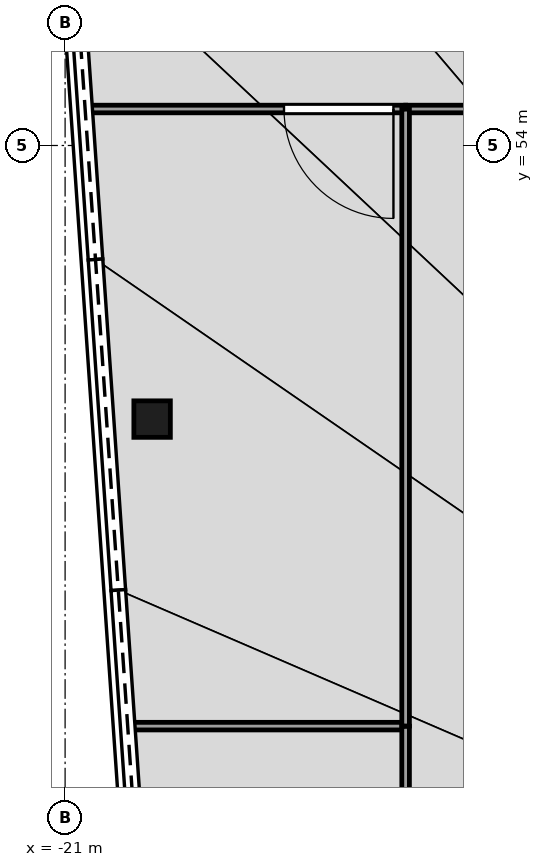
"""IFC4 building model, lengths in metres.
Left out: names, types, materials, properties, quantities, classifications, styles, units other than length and angle.
Written with IfcOpenShell. Run it as: python <this file> out.ifc"""

import sys

from ifc_helpers import new_model, si_unit, direction, frame, frame_2d, origin, origin_2d, place, context, subcontext, project, spatial, rectangle, hollow_rectangle, extrude, element, fill, save


model = new_model("IFC4")
c1 = context("Model", 3, precision=1e-05, world=origin(), true_north=direction((0.0, 1.0)))
c2 = subcontext(c1, "Body", "Model", "MODEL_VIEW")
j1 = project(units=[si_unit("LENGTHUNIT", "METRE"), si_unit("PLANEANGLEUNIT", "RADIAN")], contexts=[c1])
p1 = place(None, origin())
s1 = spatial("IfcSite", under=j1, at=p1, CompositionType="ELEMENT")
p2 = place(p1, origin())
s2 = spatial("IfcBuilding", under=s1, at=p2, CompositionType="ELEMENT")
p3 = place(p2, frame((0.0, 0.0, 368.0)))
s3 = spatial("IfcBuildingStorey", under=s2, at=p3, CompositionType="ELEMENT", Elevation=368.0)
p4 = place(p3, frame((-19.569, 49.5, 0.0), z_axis=(0.0, 0.0, 1.0), x_axis=(1.0, 0.0, 0.0)))
e1 = element("IfcColumn", 1, at=p4, inside=s3, PredefinedType="COLUMN", context=c2, shape_type="SweptSolid", body=[
    extrude(hollow_rectangle(XDim=0.6, YDim=0.6, WallThickness=0.025, at=origin_2d()), origin(), (0.0, 0.0, 1.0), 3.3),
])
p5 = place(p3, frame((-15.4, 54.6, 0.0), z_axis=(0.0, 0.0, 1.0), x_axis=(-1.0, 0.0, 0.0)))
e2 = element("IfcWall", 2, at=p5, inside=s3, PredefinedType="PARTITIONING", context=c2, shape_type="SweptSolid", body=[
    extrude(rectangle(XDim=5.351, YDim=0.125, at=frame_2d((2.675, 0.0))), origin(), (0.0, 0.0, 1.0), 2.47),
])
p6 = place(p5, frame((0.2, 0.0, 0.0)))
e3 = element("IfcOpeningElement", 3, at=p6, cuts=e2, PredefinedType="OPENING", context=c2, shape_type="SweptSolid", body=[
    extrude(rectangle(XDim=1.8, YDim=2.4, at=frame_2d((0.9, 1.2))), frame((0.0, 0.073, 0.0), z_axis=(0.0, -1.0, 0.0), x_axis=(1.0, 0.0, 0.0)), (0.0, 0.0, 1.0), 0.145),
])
p7 = place(p3, frame((-20.051, 44.45, 0.0), z_axis=(0.0, 0.0, 1.0), x_axis=(1.0, 0.0, 0.0)))
e4 = element("IfcWall", 4, at=p7, inside=s3, PredefinedType="PARTITIONING", context=c2, shape_type="SweptSolid", body=[
    extrude(rectangle(XDim=4.651, YDim=0.125, at=frame_2d((2.325, 0.0))), origin(), (0.0, 0.0, 1.0), 2.47),
])
p8 = place(p3, frame((-13.062, 54.6, 0.0), z_axis=(0.0, 0.0, 1.0), x_axis=(-1.0, 0.0, 0.0)))
e5 = element("IfcWall", 5, at=p8, inside=s3, PredefinedType="PARTITIONING", context=c2, shape_type="SweptSolid", body=[
    extrude(rectangle(XDim=2.335, YDim=0.125, at=frame_2d((1.168, 0.0))), origin(), (0.0, 0.0, 1.0), 3.3),
])
p9 = place(p3, frame((-15.4, 44.448, 0.0), z_axis=(0.0, 0.0, 1.0), x_axis=(0.0, -1.0, 0.0)))
e6 = element("IfcWall", 6, at=p9, inside=s3, PredefinedType="PARTITIONING", context=c2, shape_type="SweptSolid", body=[
    extrude(rectangle(XDim=2.446, YDim=0.125, at=frame_2d((1.223, 0.0))), origin(), (0.0, 0.0, 1.0), 3.3),
])
p10 = place(p3, frame((-15.4, 54.598, 0.0), z_axis=(0.0, 0.0, 1.0), x_axis=(0.0, -1.0, 0.0)))
e7 = element("IfcWall", 7, at=p10, inside=s3, PredefinedType="PARTITIONING", context=c2, shape_type="SweptSolid", body=[
    extrude(rectangle(XDim=10.146, YDim=0.125, at=frame_2d((5.073, 0.0))), origin(), (0.0, 0.0, 1.0), 2.78),
])
p11 = place(p6, origin())
e8 = element("IfcDoor", 8, at=p11, inside=s3, OperationType="DOUBLE_DOOR_SINGLE_SWING", PredefinedType="DOOR", context=c2, shape_type="SweptSolid", body=[
    extrude(rectangle(XDim=1.8, YDim=2.4, at=frame_2d((0.9, 1.2))), frame((0.0, 0.025, 0.0), z_axis=(0.0, -1.0, 0.0), x_axis=(1.0, 0.0, 0.0)), (0.0, 0.0, 1.0), 0.05),
])
fill(e3, e8)
save(model, sys.argv[1])
